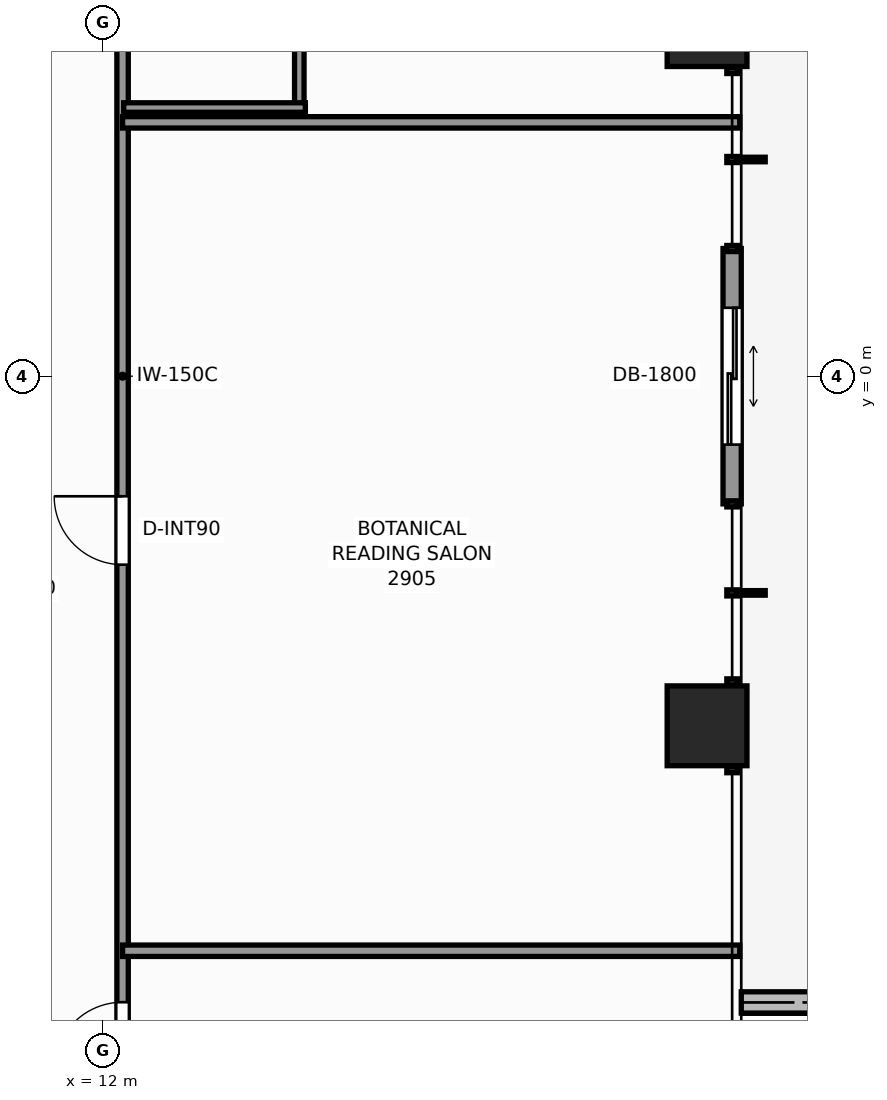
"""IFC4 building model, lengths in metres.
Left out: names, types, materials, properties, quantities, classifications, styles, units other than length and angle.
Written with IfcOpenShell. Run it as: python <this file> out.ifc"""

import sys

from ifc_helpers import new_model, si_unit, direction, frame, frame_2d, origin, origin_2d, place, context, subcontext, project, spatial, rectangle, extrude, element, fill, save


model = new_model("IFC4")
c1 = context("Model", 3, precision=1e-05, world=origin(), true_north=direction((0.0, 1.0)))
c2 = subcontext(c1, "Body", "Model", "MODEL_VIEW")
j1 = project(units=[si_unit("LENGTHUNIT", "METRE"), si_unit("PLANEANGLEUNIT", "RADIAN")], contexts=[c1])
p1 = place(None, origin())
s1 = spatial("IfcSite", under=j1, at=p1, CompositionType="ELEMENT")
p2 = place(p1, origin())
s2 = spatial("IfcBuilding", under=s1, at=p2, CompositionType="ELEMENT")
p3 = place(p2, frame((0.0, 0.0, 101.9)))
s3 = spatial("IfcBuildingStorey", under=s2, at=p3, CompositionType="ELEMENT", Elevation=101.9)
for number, where, z_axis, x_axis in (
    (1, (19.95, -4.6, 0.0), (0.0, 0.0, 1.0), (1.0, 0.0, 0.0)),
    (2, (19.95, 4.6, 0.0), (0.0, 0.0, 1.0), (1.0, 0.0, 0.0)),
):
    element("IfcColumn", number, at=place(p3, frame(where, z_axis=z_axis, x_axis=x_axis)), inside=s3, PredefinedType="COLUMN", context=c2, shape_type="SweptSolid", body=[
        extrude(rectangle(XDim=1.05, YDim=1.05, at=origin_2d()), origin(), (0.0, 0.0, 1.0), 3.3),
    ])
p4 = place(p3, frame((20.4, -8.24, -0.04), z_axis=(0.0, 0.0, 1.0), x_axis=(1.0, 0.0, 0.0)))
e3 = element("IfcWall", 3, at=p4, inside=s3, PredefinedType="PARAPET", context=c2, shape_type="SweptSolid", body=[
    extrude(rectangle(XDim=3.42, YDim=0.28, at=frame_2d((1.71, 0.0))), origin(), (0.0, 0.0, 1.0), 0.42),
])
p5 = place(p3, frame((20.28, 1.68, 0.0), z_axis=(0.0, 0.0, 1.0), x_axis=(0.0, -1.0, 0.0)))
e4 = element("IfcWall", 4, at=p5, inside=s3, PredefinedType="STANDARD", context=c2, shape_type="SweptSolid", body=[
    extrude(rectangle(XDim=3.36, YDim=0.24, at=frame_2d((1.68, 0.0))), origin(), (0.0, 0.0, 1.0), 3.08),
])
p6 = place(p5, frame((0.78, 0.0, 0.0)))
e5 = element("IfcOpeningElement", 5, at=p6, cuts=e4, PredefinedType="OPENING", context=c2, shape_type="SweptSolid", body=[
    extrude(rectangle(XDim=1.8, YDim=2.2, at=frame_2d((0.9, 1.1))), frame((0.0, 0.13, 0.0), z_axis=(0.0, -1.0, 0.0), x_axis=(1.0, 0.0, 0.0)), (0.0, 0.0, 1.0), 0.26),
])
p7 = place(p3, frame((12.26, -12.42, 0.0), z_axis=(0.0, 0.0, 1.0), x_axis=(0.0, 1.0, 0.0)))
e6 = element("IfcWall", 6, at=p7, inside=s3, PredefinedType="PARTITIONING", context=c2, shape_type="SweptSolid", body=[
    extrude(rectangle(XDim=24.84, YDim=0.15, at=frame_2d((12.42, 0.0))), origin(), (0.0, 0.0, 1.0), 2.292),
])
p8 = place(p7, frame((3.283, 0.0, 0.0)))
e7 = element("IfcOpeningElement", 7, at=p8, cuts=e6, PredefinedType="OPENING", context=c2, shape_type="SweptSolid", body=[
    extrude(rectangle(XDim=0.9, YDim=2.06, at=frame_2d((0.45, 1.03))), frame((0.0, 0.085, 0.0), z_axis=(0.0, -1.0, 0.0), x_axis=(1.0, 0.0, 0.0)), (0.0, 0.0, 1.0), 0.17),
])
p9 = place(p7, frame((9.94, 0.0, 0.0)))
e8 = element("IfcOpeningElement", 8, at=p9, cuts=e6, PredefinedType="OPENING", context=c2, shape_type="SweptSolid", body=[
    extrude(rectangle(XDim=0.9, YDim=2.06, at=frame_2d((0.45, 1.03))), frame((0.0, 0.085, 0.0), z_axis=(0.0, -1.0, 0.0), x_axis=(1.0, 0.0, 0.0)), (0.0, 0.0, 1.0), 0.17),
])
p10 = place(p7, frame((20.048, 0.0, 0.0)))
e9 = element("IfcOpeningElement", 9, at=p10, cuts=e6, PredefinedType="OPENING", context=c2, shape_type="SweptSolid", body=[
    extrude(rectangle(XDim=0.95, YDim=2.06, at=frame_2d((0.475, 1.03))), frame((0.0, 0.085, 0.0), z_axis=(0.0, -1.0, 0.0), x_axis=(1.0, 0.0, 0.0)), (0.0, 0.0, 1.0), 0.17),
])
for number, where, z_axis, x_axis in (
    (10, (12.26, -7.56, 0.0), (0.0, 0.0, 1.0), (1.0, 0.0, 0.0)),
    (11, (12.26, 3.34, 0.0), (0.0, 0.0, 1.0), (1.0, 0.0, 0.0)),
):
    element("IfcWall", number, at=place(p3, frame(where, z_axis=z_axis, x_axis=x_axis)), inside=s3, PredefinedType="PARTITIONING", context=c2, shape_type="SweptSolid", body=[
        extrude(rectangle(XDim=8.12, YDim=0.15, at=frame_2d((4.06, 0.0))), origin(), (0.0, 0.0, 1.0), 2.449),
    ])
p11 = place(p3, frame((14.585, 3.475, 0.0), z_axis=(0.0, 0.0, 1.0), x_axis=(0.0, 1.0, 0.0)))
e12 = element("IfcWall", 12, at=p11, inside=s3, PredefinedType="PARTITIONING", context=c2, shape_type="SweptSolid", body=[
    extrude(rectangle(XDim=2.77, YDim=0.125, at=frame_2d((1.385, 0.0))), origin(), (0.0, 0.0, 1.0), 2.292),
])
p12 = place(p3, frame((12.275, 3.535, 0.0), z_axis=(0.0, 0.0, 1.0), x_axis=(1.0, 0.0, 0.0)))
e13 = element("IfcWall", 13, at=p12, inside=s3, PredefinedType="PARTITIONING", context=c2, shape_type="SweptSolid", body=[
    extrude(rectangle(XDim=2.39, YDim=0.125, at=frame_2d((1.195, 0.0))), origin(), (0.0, 0.0, 1.0), 3.08),
])
p13 = place(p6, origin())
e14 = element("IfcDoor", 14, at=p13, inside=s3, OperationType="DOUBLE_DOOR_SLIDING", PredefinedType="DOOR", context=c2, shape_type="SweptSolid", body=[
    extrude(rectangle(XDim=1.8, YDim=2.2, at=frame_2d((0.9, 1.1))), frame((0.0, 0.025, 0.0), z_axis=(0.0, -1.0, 0.0), x_axis=(1.0, 0.0, 0.0)), (0.0, 0.0, 1.0), 0.05),
])
fill(e5, e14)
p14 = place(p8, origin())
e15 = element("IfcDoor", 15, at=p14, inside=s3, OperationType="SINGLE_SWING_LEFT", PredefinedType="DOOR", context=c2, shape_type="SweptSolid", body=[
    extrude(rectangle(XDim=0.9, YDim=2.06, at=frame_2d((0.45, 1.03))), frame((0.0, 0.025, 0.0), z_axis=(0.0, -1.0, 0.0), x_axis=(1.0, 0.0, 0.0)), (0.0, 0.0, 1.0), 0.05),
])
fill(e7, e15)
p15 = place(p9, origin())
e16 = element("IfcDoor", 16, at=p15, inside=s3, OperationType="SINGLE_SWING_RIGHT", PredefinedType="DOOR", context=c2, shape_type="SweptSolid", body=[
    extrude(rectangle(XDim=0.9, YDim=2.06, at=frame_2d((0.45, 1.03))), frame((0.0, 0.025, 0.0), z_axis=(0.0, -1.0, 0.0), x_axis=(1.0, 0.0, 0.0)), (0.0, 0.0, 1.0), 0.05),
])
fill(e8, e16)
save(model, sys.argv[1])
